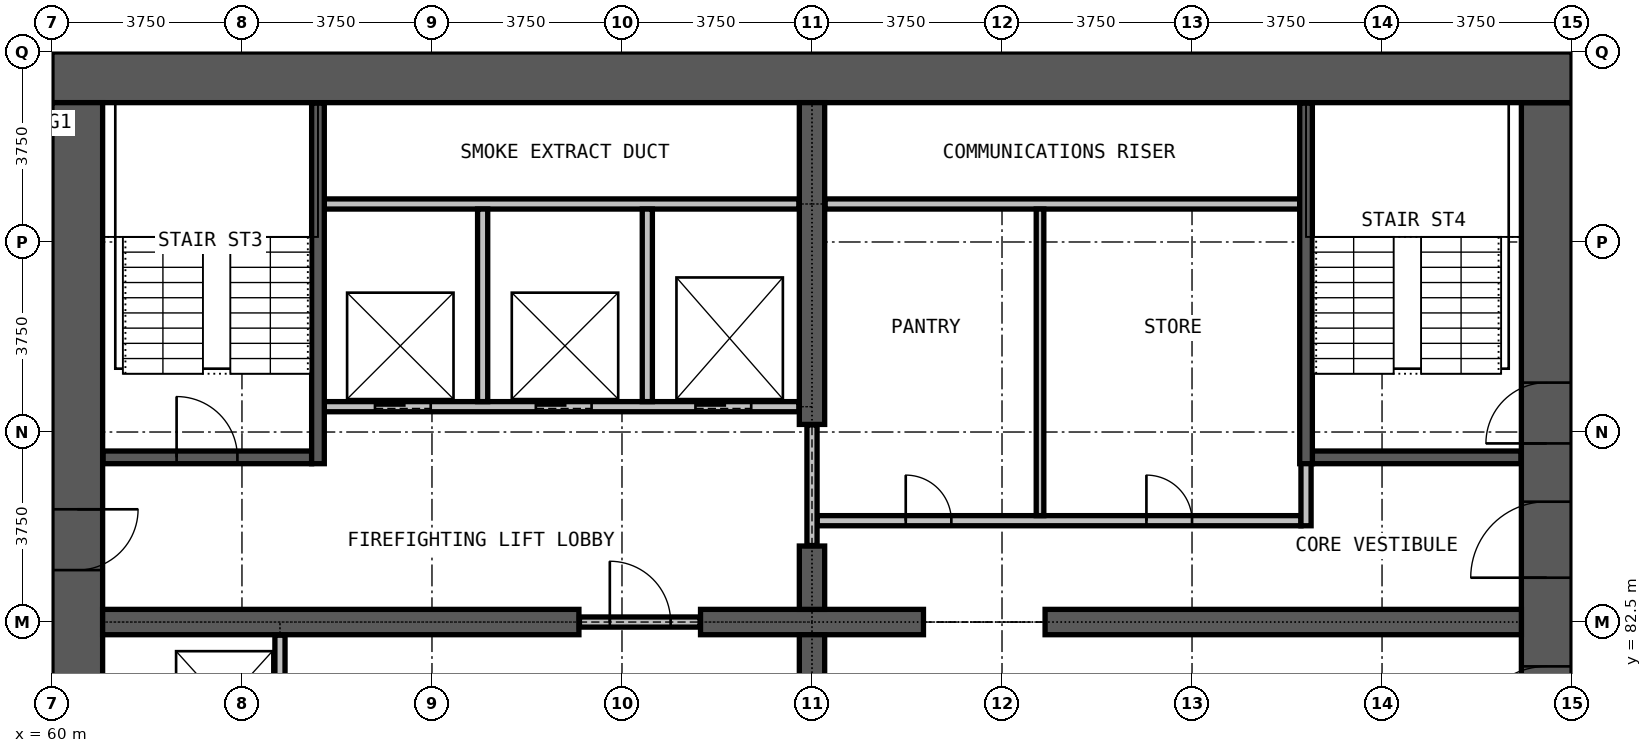
"""IFC4 building model, lengths in metres.
Left out: names, types, materials, properties, quantities, classifications, styles, units other than length and angle.
Written with IfcOpenShell. Run it as: python <this file> out.ifc"""

import sys

from ifc_helpers import new_model, si_unit, direction, frame, frame_2d, origin, place, context, subcontext, project, spatial, rectangle, extrude, element, fill, save


model = new_model("IFC4")
c1 = context("Model", 3, precision=1e-05, world=origin(), true_north=direction((0.0, 1.0)))
c2 = subcontext(c1, "Body", "Model", "MODEL_VIEW")
j1 = project(units=[si_unit("LENGTHUNIT", "METRE"), si_unit("PLANEANGLEUNIT", "RADIAN")], contexts=[c1])
p1 = place(None, origin())
s1 = spatial("IfcSite", under=j1, at=p1, CompositionType="ELEMENT")
p2 = place(p1, origin())
s2 = spatial("IfcBuilding", under=s1, at=p2, CompositionType="ELEMENT")
p3 = place(p2, frame((0.0, 0.0, 39.5)))
s3 = spatial("IfcBuildingStorey", under=s2, at=p3, CompositionType="ELEMENT", Elevation=39.5)
p4 = place(p3, frame((89.5, 72.25, 0.0), z_axis=(0.0, 0.0, 1.0), x_axis=(0.0, 1.0, 0.0)))
e1 = element("IfcWall", 1, at=p4, inside=s3, PredefinedType="SHEAR", context=c2, shape_type="SweptSolid", body=[
    extrude(rectangle(XDim=20.5, YDim=1.0, at=frame_2d((10.25, 0.0))), origin(), (0.0, 0.0, 1.0), 3.3),
])
p5 = place(p4, frame((0.275, 0.0, 0.0)))
e2 = element("IfcOpeningElement", 2, at=p5, cuts=e1, PredefinedType="OPENING", context=c2, shape_type="SweptSolid", body=[
    extrude(rectangle(XDim=1.2, YDim=2.2, at=frame_2d((0.6, 1.1))), frame((0.0, 0.51, 0.0), z_axis=(0.0, -1.0, 0.0), x_axis=(1.0, 0.0, 0.0)), (0.0, 0.0, 1.0), 1.02),
])
p6 = place(p4, frame((13.775, 0.0, 0.0)))
e3 = element("IfcOpeningElement", 3, at=p6, cuts=e1, PredefinedType="OPENING", context=c2, shape_type="SweptSolid", body=[
    extrude(rectangle(XDim=1.2, YDim=2.2, at=frame_2d((0.6, 1.1))), frame((0.0, 0.51, 0.0), z_axis=(0.0, -1.0, 0.0), x_axis=(1.0, 0.0, 0.0)), (0.0, 0.0, 1.0), 1.02),
])
p7 = place(p4, frame((7.875, 0.0, 0.0)))
e4 = element("IfcOpeningElement", 4, at=p7, cuts=e1, PredefinedType="OPENING", context=c2, shape_type="SweptSolid", body=[
    extrude(rectangle(XDim=1.5, YDim=2.2, at=frame_2d((0.75, 1.1))), frame((0.0, 0.51, 0.0), z_axis=(0.0, -1.0, 0.0), x_axis=(1.0, 0.0, 0.0)), (0.0, 0.0, 1.0), 1.02),
])
p8 = place(p4, frame((11.125, 0.0, 0.0)))
e5 = element("IfcOpeningElement", 5, at=p8, cuts=e1, PredefinedType="OPENING", context=c2, shape_type="SweptSolid", body=[
    extrude(rectangle(XDim=1.5, YDim=2.2, at=frame_2d((0.75, 1.1))), frame((0.0, 0.51, 0.0), z_axis=(0.0, -1.0, 0.0), x_axis=(1.0, 0.0, 0.0)), (0.0, 0.0, 1.0), 1.02),
])
p9 = place(p3, frame((90.0, 93.25, 0.0), z_axis=(0.0, 0.0, 1.0), x_axis=(-1.0, 0.0, 0.0)))
e6 = element("IfcWall", 6, at=p9, inside=s3, PredefinedType="SHEAR", context=c2, shape_type="SweptSolid", body=[
    extrude(rectangle(XDim=30.0, YDim=1.0, at=frame_2d((15.0, 0.0))), origin(), (0.0, 0.0, 1.0), 3.3),
])
p10 = place(p3, frame((60.5, 92.75, 0.0), z_axis=(0.0, 0.0, 1.0), x_axis=(0.0, -1.0, 0.0)))
e7 = element("IfcWall", 7, at=p10, inside=s3, PredefinedType="SHEAR", context=c2, shape_type="SweptSolid", body=[
    extrude(rectangle(XDim=20.5, YDim=1.0, at=frame_2d((10.25, 0.0))), origin(), (0.0, 0.0, 1.0), 3.3),
])
p11 = place(p10, frame((19.025, 0.0, 0.0)))
e8 = element("IfcOpeningElement", 8, at=p11, cuts=e7, PredefinedType="OPENING", context=c2, shape_type="SweptSolid", body=[
    extrude(rectangle(XDim=1.2, YDim=2.2, at=frame_2d((0.6, 1.1))), frame((0.0, 0.51, 0.0), z_axis=(0.0, -1.0, 0.0), x_axis=(1.0, 0.0, 0.0)), (0.0, 0.0, 1.0), 1.02),
])
p12 = place(p10, frame((8.025, 0.0, 0.0)))
e9 = element("IfcOpeningElement", 9, at=p12, cuts=e7, PredefinedType="OPENING", context=c2, shape_type="SweptSolid", body=[
    extrude(rectangle(XDim=1.2, YDim=2.2, at=frame_2d((0.6, 1.1))), frame((0.0, 0.51, 0.0), z_axis=(0.0, -1.0, 0.0), x_axis=(1.0, 0.0, 0.0)), (0.0, 0.0, 1.0), 1.02),
])
p13 = place(p3, frame((61.0, 82.5, 0.0), z_axis=(0.0, 0.0, 1.0), x_axis=(1.0, 0.0, 0.0)))
e10 = element("IfcWall", 10, at=p13, inside=s3, PredefinedType="SHEAR", context=c2, shape_type="SweptSolid", body=[
    extrude(rectangle(XDim=9.4, YDim=0.5, at=frame_2d((4.7, 0.0))), origin(), (0.0, 0.0, 1.0), 3.3),
])
p14 = place(p3, frame((72.8, 82.5, 0.0), z_axis=(0.0, 0.0, 1.0), x_axis=(1.0, 0.0, 0.0)))
e11 = element("IfcWall", 11, at=p14, inside=s3, PredefinedType="SHEAR", context=c2, shape_type="SweptSolid", body=[
    extrude(rectangle(XDim=4.4, YDim=0.5, at=frame_2d((2.2, 0.0))), origin(), (0.0, 0.0, 1.0), 3.3),
])
p15 = place(p3, frame((79.6, 82.5, 0.0), z_axis=(0.0, 0.0, 1.0), x_axis=(1.0, 0.0, 0.0)))
e12 = element("IfcWall", 12, at=p15, inside=s3, PredefinedType="SHEAR", context=c2, shape_type="SweptSolid", body=[
    extrude(rectangle(XDim=9.4, YDim=0.5, at=frame_2d((4.7, 0.0))), origin(), (0.0, 0.0, 1.0), 3.3),
])
for number, where, z_axis, x_axis in (
    (13, (75.0, 81.0, 0.0), (0.0, 0.0, 1.0), (0.0, 1.0, 0.0)),
    (14, (75.0, 82.75, 0.0), (0.0, 0.0, 1.0), (0.0, 1.0, 0.0)),
):
    element("IfcWall", number, at=place(p3, frame(where, z_axis=z_axis, x_axis=x_axis)), inside=s3, PredefinedType="SHEAR", context=c2, shape_type="SweptSolid", body=[
        extrude(rectangle(XDim=1.25, YDim=0.5, at=frame_2d((0.625, 0.0))), origin(), (0.0, 0.0, 1.0), 3.3),
    ])
p16 = place(p3, frame((75.0, 86.4, 0.0), z_axis=(0.0, 0.0, 1.0), x_axis=(0.0, 1.0, 0.0)))
e15 = element("IfcWall", 15, at=p16, inside=s3, PredefinedType="SHEAR", context=c2, shape_type="SweptSolid", body=[
    extrude(rectangle(XDim=6.35, YDim=0.5, at=frame_2d((3.175, 0.0))), origin(), (0.0, 0.0, 1.0), 3.3),
])
p17 = place(p3, frame((70.41, 82.5, 0.0), z_axis=(0.0, 0.0, 1.0), x_axis=(1.0, 0.0, 0.0)))
e16 = element("IfcWall", 16, at=p17, inside=s3, PredefinedType="PARTITIONING", context=c2, shape_type="SweptSolid", body=[
    extrude(rectangle(XDim=2.38, YDim=0.2, at=frame_2d((1.19, 0.0))), origin(), (0.0, 0.0, 1.0), 2.4),
])
p18 = place(p17, frame((0.6, 0.0, 0.0)))
e17 = element("IfcOpeningElement", 17, at=p18, cuts=e16, PredefinedType="OPENING", context=c2, shape_type="SweptSolid", body=[
    extrude(rectangle(XDim=1.2, YDim=2.2, at=frame_2d((0.6, 1.1))), frame((0.0, 0.11, 0.0), z_axis=(0.0, -1.0, 0.0), x_axis=(1.0, 0.0, 0.0)), (0.0, 0.0, 1.0), 0.22),
])
p19 = place(p3, frame((75.1, 84.5, 0.0), z_axis=(0.0, 0.0, 1.0), x_axis=(1.0, 0.0, 0.0)))
e18 = element("IfcWall", 18, at=p19, inside=s3, PredefinedType="PARTITIONING", context=c2, shape_type="SweptSolid", body=[
    extrude(rectangle(XDim=9.55, YDim=0.2, at=frame_2d((4.775, 0.0))), origin(), (0.0, 0.0, 1.0), 3.0),
])
p20 = place(p19, frame((1.75, 0.0, 0.0)))
e19 = element("IfcOpeningElement", 19, at=p20, cuts=e18, PredefinedType="OPENING", context=c2, shape_type="SweptSolid", body=[
    extrude(rectangle(XDim=0.9, YDim=2.2, at=frame_2d((0.45, 1.1))), frame((0.0, 0.11, 0.0), z_axis=(0.0, -1.0, 0.0), x_axis=(1.0, 0.0, 0.0)), (0.0, 0.0, 1.0), 0.22),
])
p21 = place(p19, frame((6.5, 0.0, 0.0)))
e20 = element("IfcOpeningElement", 20, at=p21, cuts=e18, PredefinedType="OPENING", context=c2, shape_type="SweptSolid", body=[
    extrude(rectangle(XDim=0.9, YDim=2.2, at=frame_2d((0.45, 1.1))), frame((0.0, 0.11, 0.0), z_axis=(0.0, -1.0, 0.0), x_axis=(1.0, 0.0, 0.0)), (0.0, 0.0, 1.0), 0.22),
])
p22 = place(p3, frame((75.26, 90.75, 0.0), z_axis=(0.0, 0.0, 1.0), x_axis=(1.0, 0.0, 0.0)))
e21 = element("IfcWall", 21, at=p22, inside=s3, PredefinedType="PARTITIONING", context=c2, shape_type="SweptSolid", body=[
    extrude(rectangle(XDim=9.365, YDim=0.2, at=frame_2d((4.683, 0.0))), origin(), (0.0, 0.0, 1.0), 3.0),
])
p23 = place(p3, frame((75.0, 84.01, 0.0), z_axis=(0.0, 0.0, 1.0), x_axis=(0.0, 1.0, 0.0)))
e22 = element("IfcWall", 22, at=p23, inside=s3, PredefinedType="PARTITIONING", context=c2, shape_type="SweptSolid", body=[
    extrude(rectangle(XDim=2.38, YDim=0.2, at=frame_2d((1.19, 0.0))), origin(), (0.0, 0.0, 1.0), 2.4),
])
p24 = place(p3, frame((84.75, 84.4, 0.0), z_axis=(0.0, 0.0, 1.0), x_axis=(0.0, 1.0, 0.0)))
e23 = element("IfcWall", 23, at=p24, inside=s3, PredefinedType="PARTITIONING", context=c2, shape_type="SweptSolid", body=[
    extrude(rectangle(XDim=1.475, YDim=0.2, at=frame_2d((0.738, 0.0))), origin(), (0.0, 0.0, 1.0), 3.0),
])
p25 = place(p3, frame((79.5, 84.6, 0.0), z_axis=(0.0, 0.0, 1.0), x_axis=(0.0, 1.0, 0.0)))
e24 = element("IfcWall", 24, at=p25, inside=s3, PredefinedType="PARTITIONING", context=c2, shape_type="SweptSolid", body=[
    extrude(rectangle(XDim=6.05, YDim=0.15, at=frame_2d((3.025, 0.0))), origin(), (0.0, 0.0, 1.0), 3.0),
])
p26 = place(p3, frame((65.375, 86.75, 0.0), z_axis=(0.0, 0.0, 1.0), x_axis=(1.0, 0.0, 0.0)))
e25 = element("IfcWall", 25, at=p26, inside=s3, PredefinedType="PARTITIONING", context=c2, shape_type="SweptSolid", body=[
    extrude(rectangle(XDim=9.365, YDim=0.2, at=frame_2d((4.683, 0.0))), origin(), (0.0, 0.0, 1.0), 3.0),
])
p27 = place(p26, frame((1.0, 0.0, 0.0)))
e26 = element("IfcOpeningElement", 26, at=p27, cuts=e25, PredefinedType="OPENING", context=c2, shape_type="SweptSolid", body=[
    extrude(rectangle(XDim=1.1, YDim=2.2, at=frame_2d((0.55, 1.1))), frame((0.0, 0.11, 0.0), z_axis=(0.0, -1.0, 0.0), x_axis=(1.0, 0.0, 0.0)), (0.0, 0.0, 1.0), 0.22),
])
p28 = place(p26, frame((4.175, 0.0, 0.0)))
e27 = element("IfcOpeningElement", 27, at=p28, cuts=e25, PredefinedType="OPENING", context=c2, shape_type="SweptSolid", body=[
    extrude(rectangle(XDim=1.1, YDim=2.2, at=frame_2d((0.55, 1.1))), frame((0.0, 0.11, 0.0), z_axis=(0.0, -1.0, 0.0), x_axis=(1.0, 0.0, 0.0)), (0.0, 0.0, 1.0), 0.22),
])
p29 = place(p26, frame((7.325, 0.0, 0.0)))
e28 = element("IfcOpeningElement", 28, at=p29, cuts=e25, PredefinedType="OPENING", context=c2, shape_type="SweptSolid", body=[
    extrude(rectangle(XDim=1.1, YDim=2.2, at=frame_2d((0.55, 1.1))), frame((0.0, 0.11, 0.0), z_axis=(0.0, -1.0, 0.0), x_axis=(1.0, 0.0, 0.0)), (0.0, 0.0, 1.0), 0.22),
])
p30 = place(p3, frame((65.375, 90.75, 0.0), z_axis=(0.0, 0.0, 1.0), x_axis=(1.0, 0.0, 0.0)))
e29 = element("IfcWall", 29, at=p30, inside=s3, PredefinedType="PARTITIONING", context=c2, shape_type="SweptSolid", body=[
    extrude(rectangle(XDim=9.365, YDim=0.2, at=frame_2d((4.683, 0.0))), origin(), (0.0, 0.0, 1.0), 3.0),
])
p31 = place(p3, frame((64.5, 79.375, 0.0), z_axis=(0.0, 0.0, 1.0), x_axis=(0.0, 1.0, 0.0)))
e30 = element("IfcWall", 30, at=p31, inside=s3, PredefinedType="PARTITIONING", context=c2, shape_type="SweptSolid", body=[
    extrude(rectangle(XDim=2.865, YDim=0.2, at=frame_2d((1.433, 0.0))), origin(), (0.0, 0.0, 1.0), 3.0),
])
for number, where, z_axis, x_axis in (
    (31, (68.5, 86.85, 0.0), (0.0, 0.0, 1.0), (0.0, 1.0, 0.0)),
    (32, (71.75, 86.85, 0.0), (0.0, 0.0, 1.0), (0.0, 1.0, 0.0)),
):
    element("IfcWall", number, at=place(p3, frame(where, z_axis=z_axis, x_axis=x_axis)), inside=s3, PredefinedType="PARTITIONING", context=c2, shape_type="SweptSolid", body=[
        extrude(rectangle(XDim=3.8, YDim=0.2, at=frame_2d((1.9, 0.0))), origin(), (0.0, 0.0, 1.0), 3.0),
    ])
p32 = place(p3, frame((61.01, 85.75, 0.0), z_axis=(0.0, 0.0, 1.0), x_axis=(1.0, 0.0, 0.0)))
e33 = element("IfcWall", 33, at=p32, inside=s3, PredefinedType="PARTITIONING", context=c2, shape_type="SweptSolid", body=[
    extrude(rectangle(XDim=4.115, YDim=0.25, at=frame_2d((2.058, 0.0))), origin(), (0.0, 0.0, 1.0), 3.0),
])
p33 = place(p32, frame((1.45, 0.0, 0.0)))
e34 = element("IfcOpeningElement", 34, at=p33, cuts=e33, PredefinedType="OPENING", context=c2, shape_type="SweptSolid", body=[
    extrude(rectangle(XDim=1.2, YDim=2.2, at=frame_2d((0.6, 1.1))), frame((0.0, 0.135, 0.0), z_axis=(0.0, -1.0, 0.0), x_axis=(1.0, 0.0, 0.0)), (0.0, 0.0, 1.0), 0.27),
])
p34 = place(p3, frame((84.875, 85.75, 0.0), z_axis=(0.0, 0.0, 1.0), x_axis=(1.0, 0.0, 0.0)))
e35 = element("IfcWall", 35, at=p34, inside=s3, PredefinedType="PARTITIONING", context=c2, shape_type="SweptSolid", body=[
    extrude(rectangle(XDim=4.115, YDim=0.25, at=frame_2d((2.058, 0.0))), origin(), (0.0, 0.0, 1.0), 3.0),
])
for number, where, z_axis, x_axis in (
    (36, (65.25, 85.625, 0.0), (0.0, 0.0, 1.0), (0.0, 1.0, 0.0)),
    (37, (84.75, 85.625, 0.0), (0.0, 0.0, 1.0), (0.0, 1.0, 0.0)),
):
    element("IfcWall", number, at=place(p3, frame(where, z_axis=z_axis, x_axis=x_axis)), inside=s3, PredefinedType="PARTITIONING", context=c2, shape_type="SweptSolid", body=[
        extrude(rectangle(XDim=7.115, YDim=0.25, at=frame_2d((3.558, 0.0))), origin(), (0.0, 0.0, 1.0), 3.0),
    ])
p35 = place(p27, origin())
e38 = element("IfcDoor", 38, at=p35, inside=s3, OperationType="DOUBLE_DOOR_SLIDING", PredefinedType="DOOR", context=c2, shape_type="SweptSolid", body=[
    extrude(rectangle(XDim=1.1, YDim=2.2, at=frame_2d((0.55, 1.1))), frame((0.0, 0.025, 0.0), z_axis=(0.0, -1.0, 0.0), x_axis=(1.0, 0.0, 0.0)), (0.0, 0.0, 1.0), 0.05),
])
fill(e26, e38)
p36 = place(p28, origin())
e39 = element("IfcDoor", 39, at=p36, inside=s3, OperationType="DOUBLE_DOOR_SLIDING", PredefinedType="DOOR", context=c2, shape_type="SweptSolid", body=[
    extrude(rectangle(XDim=1.1, YDim=2.2, at=frame_2d((0.55, 1.1))), frame((0.0, 0.025, 0.0), z_axis=(0.0, -1.0, 0.0), x_axis=(1.0, 0.0, 0.0)), (0.0, 0.0, 1.0), 0.05),
])
fill(e27, e39)
p37 = place(p29, origin())
e40 = element("IfcDoor", 40, at=p37, inside=s3, OperationType="DOUBLE_DOOR_SLIDING", PredefinedType="DOOR", context=c2, shape_type="SweptSolid", body=[
    extrude(rectangle(XDim=1.1, YDim=2.2, at=frame_2d((0.55, 1.1))), frame((0.0, 0.025, 0.0), z_axis=(0.0, -1.0, 0.0), x_axis=(1.0, 0.0, 0.0)), (0.0, 0.0, 1.0), 0.05),
])
fill(e28, e40)
p38 = place(p18, origin())
e41 = element("IfcDoor", 41, at=p38, inside=s3, OperationType="SINGLE_SWING_LEFT", PredefinedType="DOOR", context=c2, shape_type="SweptSolid", body=[
    extrude(rectangle(XDim=1.2, YDim=2.2, at=frame_2d((0.6, 1.1))), frame((0.0, 0.025, 0.0), z_axis=(0.0, -1.0, 0.0), x_axis=(1.0, 0.0, 0.0)), (0.0, 0.0, 1.0), 0.05),
])
fill(e17, e41)
p39 = place(p33, origin())
e42 = element("IfcDoor", 42, at=p39, inside=s3, OperationType="SINGLE_SWING_LEFT", PredefinedType="DOOR", context=c2, shape_type="SweptSolid", body=[
    extrude(rectangle(XDim=1.2, YDim=2.2, at=frame_2d((0.6, 1.1))), frame((0.0, 0.025, 0.0), z_axis=(0.0, -1.0, 0.0), x_axis=(1.0, 0.0, 0.0)), (0.0, 0.0, 1.0), 0.05),
])
fill(e34, e42)
p40 = place(p6, origin())
e43 = element("IfcDoor", 43, at=p40, inside=s3, OperationType="SINGLE_SWING_LEFT", PredefinedType="DOOR", context=c2, shape_type="SweptSolid", body=[
    extrude(rectangle(XDim=1.2, YDim=2.2, at=frame_2d((0.6, 1.1))), frame((0.0, 0.025, 0.0), z_axis=(0.0, -1.0, 0.0), x_axis=(1.0, 0.0, 0.0)), (0.0, 0.0, 1.0), 0.05),
])
fill(e3, e43)
p41 = place(p7, origin())
e44 = element("IfcDoor", 44, at=p41, inside=s3, OperationType="DOUBLE_DOOR_SINGLE_SWING", PredefinedType="DOOR", context=c2, shape_type="SweptSolid", body=[
    extrude(rectangle(XDim=1.5, YDim=2.2, at=frame_2d((0.75, 1.1))), frame((0.0, 0.025, 0.0), z_axis=(0.0, -1.0, 0.0), x_axis=(1.0, 0.0, 0.0)), (0.0, 0.0, 1.0), 0.05),
])
fill(e4, e44)
p42 = place(p12, origin())
e45 = element("IfcDoor", 45, at=p42, inside=s3, OperationType="SINGLE_SWING_LEFT", PredefinedType="DOOR", context=c2, shape_type="SweptSolid", body=[
    extrude(rectangle(XDim=1.2, YDim=2.2, at=frame_2d((0.6, 1.1))), frame((0.0, 0.025, 0.0), z_axis=(0.0, -1.0, 0.0), x_axis=(1.0, 0.0, 0.0)), (0.0, 0.0, 1.0), 0.05),
])
fill(e9, e45)
p43 = place(p8, origin())
e46 = element("IfcDoor", 46, at=p43, inside=s3, OperationType="DOUBLE_DOOR_SINGLE_SWING", PredefinedType="DOOR", context=c2, shape_type="SweptSolid", body=[
    extrude(rectangle(XDim=1.5, YDim=2.2, at=frame_2d((0.75, 1.1))), frame((0.0, 0.025, 0.0), z_axis=(0.0, -1.0, 0.0), x_axis=(1.0, 0.0, 0.0)), (0.0, 0.0, 1.0), 0.05),
])
fill(e5, e46)
p44 = place(p20, origin())
e47 = element("IfcDoor", 47, at=p44, inside=s3, OperationType="SINGLE_SWING_RIGHT", PredefinedType="DOOR", context=c2, shape_type="SweptSolid", body=[
    extrude(rectangle(XDim=0.9, YDim=2.2, at=frame_2d((0.45, 1.1))), frame((0.0, 0.025, 0.0), z_axis=(0.0, -1.0, 0.0), x_axis=(1.0, 0.0, 0.0)), (0.0, 0.0, 1.0), 0.05),
])
fill(e19, e47)
p45 = place(p21, origin())
e48 = element("IfcDoor", 48, at=p45, inside=s3, OperationType="SINGLE_SWING_LEFT", PredefinedType="DOOR", context=c2, shape_type="SweptSolid", body=[
    extrude(rectangle(XDim=0.9, YDim=2.2, at=frame_2d((0.45, 1.1))), frame((0.0, 0.025, 0.0), z_axis=(0.0, -1.0, 0.0), x_axis=(1.0, 0.0, 0.0)), (0.0, 0.0, 1.0), 0.05),
])
fill(e20, e48)
save(model, sys.argv[1])
